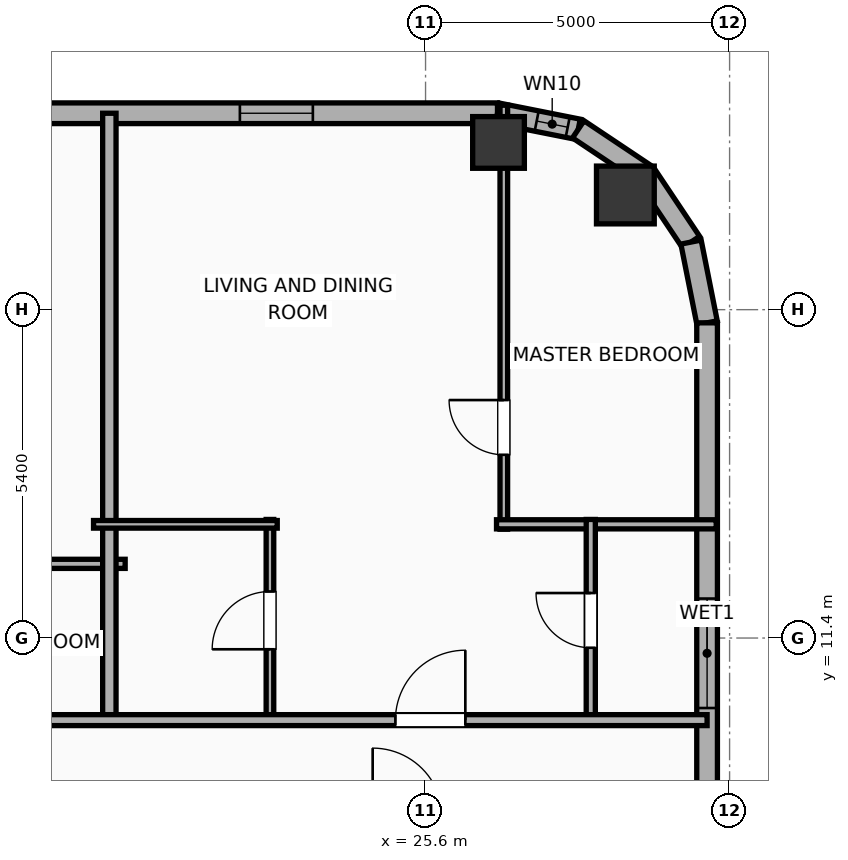
"""IFC4 building model, lengths in metres.
Left out: names, types, materials, properties, quantities, classifications, styles, units other than length and angle.
Written with IfcOpenShell. Run it as: python <this file> out.ifc"""

import sys

from ifc_helpers import new_model, si_unit, direction, frame, frame_2d, origin, origin_2d, place, context, subcontext, project, spatial, rectangle, hollow_rectangle, hollow_circle, extrude, element, fill, save


model = new_model("IFC4")
c1 = context("Model", 3, precision=1e-05, world=origin(), true_north=direction((0.0, 1.0)))
c2 = subcontext(c1, "Body", "Model", "MODEL_VIEW")
j1 = project(units=[si_unit("LENGTHUNIT", "METRE"), si_unit("PLANEANGLEUNIT", "RADIAN")], contexts=[c1])
p1 = place(None, origin())
s1 = spatial("IfcSite", under=j1, at=p1, CompositionType="ELEMENT")
p2 = place(p1, origin())
s2 = spatial("IfcBuilding", under=s1, at=p2, CompositionType="ELEMENT")
p3 = place(p2, frame((0.0, 0.0, 211.9)))
s3 = spatial("IfcBuildingStorey", under=s2, at=p3, CompositionType="ELEMENT", Elevation=211.9)
p4 = place(p3, frame((28.886, 18.686, 0.0), z_axis=(0.0, 0.0, 1.0), x_axis=(1.0, 0.0, 0.0)))
e1 = element("IfcColumn", 1, at=p4, inside=s3, PredefinedType="COLUMN", context=c2, shape_type="SweptSolid", body=[
    extrude(hollow_circle(Radius=0.475, WallThickness=0.032, at=origin_2d()), origin(), (0.0, 0.0, 1.0), 3.9),
])
p5 = place(p3, frame((26.8, 19.55, 0.0), z_axis=(0.0, 0.0, 1.0), x_axis=(1.0, 0.0, 0.0)))
e2 = element("IfcColumn", 2, at=p5, inside=s3, PredefinedType="COLUMN", context=c2, shape_type="SweptSolid", body=[
    extrude(hollow_rectangle(XDim=0.85, YDim=0.85, WallThickness=0.028, at=origin_2d()), origin(), (0.0, 0.0, 1.0), 3.9),
])
p6 = place(p3, frame((9.931, 20.03, 0.0), z_axis=(0.0, 0.0, 1.0), x_axis=(1.0, 0.0, 0.0)))
e3 = element("IfcWall", 3, at=p6, inside=s3, PredefinedType="ELEMENTEDWALL", context=c2, shape_type="SweptSolid", body=[
    extrude(rectangle(XDim=16.853, YDim=0.34, at=frame_2d((8.426, 0.0))), origin(), (0.0, 0.0, 1.0), 3.65),
])
p7 = place(p6, frame((2.402, 0.0, 0.75)))
e4 = element("IfcOpeningElement", 4, at=p7, cuts=e3, PredefinedType="OPENING", context=c2, shape_type="SweptSolid", body=[
    extrude(rectangle(XDim=1.2, YDim=2.05, at=frame_2d((0.6, 1.025))), frame((0.0, 0.18, 0.0), z_axis=(0.0, -1.0, 0.0), x_axis=(1.0, 0.0, 0.0)), (0.0, 0.0, 1.0), 0.36),
])
p8 = place(p6, frame((7.609, 0.0, 0.75)))
e5 = element("IfcOpeningElement", 5, at=p8, cuts=e3, PredefinedType="OPENING", context=c2, shape_type="SweptSolid", body=[
    extrude(rectangle(XDim=1.2, YDim=2.05, at=frame_2d((0.6, 1.025))), frame((0.0, 0.18, 0.0), z_axis=(0.0, -1.0, 0.0), x_axis=(1.0, 0.0, 0.0)), (0.0, 0.0, 1.0), 0.36),
])
p9 = place(p6, frame((12.616, 0.0, 0.75)))
e6 = element("IfcOpeningElement", 6, at=p9, cuts=e3, PredefinedType="OPENING", context=c2, shape_type="SweptSolid", body=[
    extrude(rectangle(XDim=1.2, YDim=2.05, at=frame_2d((0.6, 1.025))), frame((0.0, 0.18, 0.0), z_axis=(0.0, -1.0, 0.0), x_axis=(1.0, 0.0, 0.0)), (0.0, 0.0, 1.0), 0.36),
])
p10 = place(p3, frame((26.783, 20.03, 0.0), z_axis=(0.0, 0.0, 1.0), x_axis=(0.980788153188, -0.195075878998, 0.0)))
e7 = element("IfcWall", 7, at=p10, inside=s3, PredefinedType="ELEMENTEDWALL", context=c2, shape_type="SweptSolid", body=[
    extrude(rectangle(XDim=1.354, YDim=0.34, at=frame_2d((0.677, 0.0))), origin(), (0.0, 0.0, 1.0), 3.65),
])
p11 = place(p10, frame((0.657, 0.0, 0.75)))
e8 = element("IfcOpeningElement", 8, at=p11, cuts=e7, PredefinedType="OPENING", context=c2, shape_type="SweptSolid", body=[
    extrude(rectangle(XDim=0.52, YDim=2.05, at=frame_2d((0.26, 1.025))), frame((0.0, 0.18, 0.0), z_axis=(0.0, -1.0, 0.0), x_axis=(1.0, 0.0, 0.0)), (0.0, 0.0, 1.0), 0.36),
])
for number, where, z_axis, x_axis in (
    (9, (28.111, 19.766, 0.0), (0.0, 0.0, 1.0), (0.831, -0.556, 0.0)),
    (10, (29.223, 19.023, 0.0), (0.0, 0.0, 1.0), (0.556, -0.831, 0.0)),
):
    element("IfcWall", number, at=place(p3, frame(where, z_axis=z_axis, x_axis=x_axis)), inside=s3, PredefinedType="ELEMENTEDWALL", context=c2, shape_type="SweptSolid", body=[
        extrude(rectangle(XDim=1.337, YDim=0.34, at=frame_2d((0.668, 0.0))), origin(), (0.0, 0.0, 1.0), 3.65),
    ])
p12 = place(p3, frame((29.966, 17.911, 0.0), z_axis=(0.0, 0.0, 1.0), x_axis=(0.195075878998, -0.980788153188, 0.0)))
e11 = element("IfcWall", 11, at=p12, inside=s3, PredefinedType="ELEMENTEDWALL", context=c2, shape_type="SweptSolid", body=[
    extrude(rectangle(XDim=1.354, YDim=0.34, at=frame_2d((0.677, 0.0))), origin(), (0.0, 0.0, 1.0), 3.65),
])
p13 = place(p3, frame((30.23, 16.583, 0.0), z_axis=(0.0, 0.0, 1.0), x_axis=(0.0, -1.0, 0.0)))
e12 = element("IfcWall", 12, at=p13, inside=s3, PredefinedType="ELEMENTEDWALL", context=c2, shape_type="SweptSolid", body=[
    extrude(rectangle(XDim=10.869, YDim=0.34, at=frame_2d((5.434, 0.0))), origin(), (0.0, 0.0, 1.0), 3.65),
])
p14 = place(p13, frame((4.534, 0.0, 0.75)))
e13 = element("IfcOpeningElement", 13, at=p14, cuts=e12, PredefinedType="OPENING", context=c2, shape_type="SweptSolid", body=[
    extrude(rectangle(XDim=1.8, YDim=2.1, at=frame_2d((0.9, 1.05))), frame((0.0, 0.18, 0.0), z_axis=(0.0, -1.0, 0.0), x_axis=(1.0, 0.0, 0.0)), (0.0, 0.0, 1.0), 0.36),
])
p15 = place(p3, frame((18.213, 12.62, 0.0), z_axis=(0.0, 0.0, 1.0), x_axis=(1.0, 0.0, 0.0)))
e14 = element("IfcWall", 14, at=p15, inside=s3, PredefinedType="PLUMBINGWALL", context=c2, shape_type="SweptSolid", body=[
    extrude(rectangle(XDim=2.447, YDim=0.15, at=frame_2d((1.224, 0.0))), origin(), (0.0, 0.0, 1.0), 3.65),
])
p16 = place(p3, frame((20.4, 9.97, 0.0), z_axis=(0.0, 0.0, 1.0), x_axis=(0.0, 1.0, 0.0)))
e15 = element("IfcWall", 15, at=p16, inside=s3, PredefinedType="PARTITIONING", context=c2, shape_type="SweptSolid", body=[
    extrude(rectangle(XDim=10.06, YDim=0.22, at=frame_2d((5.03, 0.0))), origin(), (0.0, 0.0, 1.0), 3.65),
])
p17 = place(p3, frame((26.887, 13.19, 0.0), z_axis=(0.0, 0.0, 1.0), x_axis=(0.0, 1.0, 0.0)))
e16 = element("IfcWall", 16, at=p17, inside=s3, PredefinedType="PARTITIONING", context=c2, shape_type="SweptSolid", body=[
    extrude(rectangle(XDim=6.972, YDim=0.125, at=frame_2d((3.486, 0.0))), origin(), (0.0, 0.0, 1.0), 3.65),
])
p18 = place(p17, frame((1.223, 0.0, 0.0)))
e17 = element("IfcOpeningElement", 17, at=p18, cuts=e16, PredefinedType="OPENING", context=c2, shape_type="SweptSolid", body=[
    extrude(rectangle(XDim=0.9, YDim=2.05, at=frame_2d((0.45, 1.025))), frame((0.0, 0.073, 0.0), z_axis=(0.0, -1.0, 0.0), x_axis=(1.0, 0.0, 0.0)), (0.0, 0.0, 1.0), 0.145),
])
p19 = place(p3, frame((26.767, 13.27, 0.0), z_axis=(0.0, 0.0, 1.0), x_axis=(1.0, 0.0, 0.0)))
e18 = element("IfcWall", 18, at=p19, inside=s3, PredefinedType="PLUMBINGWALL", context=c2, shape_type="SweptSolid", body=[
    extrude(rectangle(XDim=3.613, YDim=0.15, at=frame_2d((1.806, 0.0))), origin(), (0.0, 0.0, 1.0), 3.65),
])
p20 = place(p3, frame((23.041, 10.03, 0.0), z_axis=(0.0, 0.0, 1.0), x_axis=(0.0, 1.0, 0.0)))
e19 = element("IfcWall", 19, at=p20, inside=s3, PredefinedType="PARTITIONING", context=c2, shape_type="SweptSolid", body=[
    extrude(rectangle(XDim=3.32, YDim=0.125, at=frame_2d((1.66, 0.0))), origin(), (0.0, 0.0, 1.0), 3.65),
])
p21 = place(p20, frame((1.185, 0.0, 0.0)))
e20 = element("IfcOpeningElement", 20, at=p21, cuts=e19, PredefinedType="OPENING", context=c2, shape_type="SweptSolid", body=[
    extrude(rectangle(XDim=0.95, YDim=2.05, at=frame_2d((0.475, 1.025))), frame((0.0, 0.073, 0.0), z_axis=(0.0, -1.0, 0.0), x_axis=(1.0, 0.0, 0.0)), (0.0, 0.0, 1.0), 0.145),
])
p22 = place(p3, frame((20.14, 13.27, 0.0), z_axis=(0.0, 0.0, 1.0), x_axis=(1.0, 0.0, 0.0)))
e21 = element("IfcWall", 21, at=p22, inside=s3, PredefinedType="PARTITIONING", context=c2, shape_type="SweptSolid", body=[
    extrude(rectangle(XDim=3.021, YDim=0.125, at=frame_2d((1.51, 0.0))), origin(), (0.0, 0.0, 1.0), 3.65),
])
p23 = place(p3, frame((28.317, 10.03, 0.0), z_axis=(0.0, 0.0, 1.0), x_axis=(0.0, 1.0, 0.0)))
e22 = element("IfcWall", 22, at=p23, inside=s3, PredefinedType="PLUMBINGWALL", context=c2, shape_type="SweptSolid", body=[
    extrude(rectangle(XDim=3.32, YDim=0.15, at=frame_2d((1.66, 0.0))), origin(), (0.0, 0.0, 1.0), 3.65),
])
p24 = place(p23, frame((1.21, 0.0, 0.0)))
e23 = element("IfcOpeningElement", 23, at=p24, cuts=e22, PredefinedType="OPENING", context=c2, shape_type="SweptSolid", body=[
    extrude(rectangle(XDim=0.9, YDim=2.05, at=frame_2d((0.45, 1.025))), frame((0.0, 0.085, 0.0), z_axis=(0.0, -1.0, 0.0), x_axis=(1.0, 0.0, 0.0)), (0.0, 0.0, 1.0), 0.17),
])
p25 = place(p3, frame((-26.23, 10.05, 0.0), z_axis=(0.0, 0.0, 1.0), x_axis=(1.0, 0.0, 0.0)))
e24 = element("IfcWall", 24, at=p25, inside=s3, PredefinedType="PARTITIONING", context=c2, shape_type="SweptSolid", body=[
    extrude(rectangle(XDim=56.46, YDim=0.18, at=frame_2d((28.23, 0.0))), origin(), (0.0, 0.0, 1.0), 3.65),
])
p26 = place(p25, frame((4.41, 0.0, 0.0)))
e25 = element("IfcOpeningElement", 25, at=p26, cuts=e24, PredefinedType="OPENING", context=c2, shape_type="SweptSolid", body=[
    extrude(rectangle(XDim=1.15, YDim=2.05, at=frame_2d((0.575, 1.025))), frame((0.0, 0.1, 0.0), z_axis=(0.0, -1.0, 0.0), x_axis=(1.0, 0.0, 0.0)), (0.0, 0.0, 1.0), 0.2),
])
p27 = place(p25, frame((12.203, 0.0, 0.0)))
e26 = element("IfcOpeningElement", 26, at=p27, cuts=e24, PredefinedType="OPENING", context=c2, shape_type="SweptSolid", body=[
    extrude(rectangle(XDim=0.9, YDim=2.05, at=frame_2d((0.45, 1.025))), frame((0.0, 0.1, 0.0), z_axis=(0.0, -1.0, 0.0), x_axis=(1.0, 0.0, 0.0)), (0.0, 0.0, 1.0), 0.2),
])
p28 = place(p25, frame((19.429, 0.0, 0.0)))
e27 = element("IfcOpeningElement", 27, at=p28, cuts=e24, PredefinedType="OPENING", context=c2, shape_type="SweptSolid", body=[
    extrude(rectangle(XDim=1.15, YDim=2.05, at=frame_2d((0.575, 1.025))), frame((0.0, 0.1, 0.0), z_axis=(0.0, -1.0, 0.0), x_axis=(1.0, 0.0, 0.0)), (0.0, 0.0, 1.0), 0.2),
])
p29 = place(p25, frame((24.601, 0.0, 0.0)))
e28 = element("IfcOpeningElement", 28, at=p29, cuts=e24, PredefinedType="OPENING", context=c2, shape_type="SweptSolid", body=[
    extrude(rectangle(XDim=0.9, YDim=2.05, at=frame_2d((0.45, 1.025))), frame((0.0, 0.1, 0.0), z_axis=(0.0, -1.0, 0.0), x_axis=(1.0, 0.0, 0.0)), (0.0, 0.0, 1.0), 0.2),
])
p30 = place(p25, frame((30.801, 0.0, 0.0)))
e29 = element("IfcOpeningElement", 29, at=p30, cuts=e24, PredefinedType="OPENING", context=c2, shape_type="SweptSolid", body=[
    extrude(rectangle(XDim=0.9, YDim=2.05, at=frame_2d((0.45, 1.025))), frame((0.0, 0.1, 0.0), z_axis=(0.0, -1.0, 0.0), x_axis=(1.0, 0.0, 0.0)), (0.0, 0.0, 1.0), 0.2),
])
p31 = place(p25, frame((35.52, 0.0, 0.0)))
e30 = element("IfcOpeningElement", 30, at=p31, cuts=e24, PredefinedType="OPENING", context=c2, shape_type="SweptSolid", body=[
    extrude(rectangle(XDim=1.15, YDim=2.05, at=frame_2d((0.575, 1.025))), frame((0.0, 0.1, 0.0), z_axis=(0.0, -1.0, 0.0), x_axis=(1.0, 0.0, 0.0)), (0.0, 0.0, 1.0), 0.2),
])
p32 = place(p25, frame((43.199, 0.0, 0.0)))
e31 = element("IfcOpeningElement", 31, at=p32, cuts=e24, PredefinedType="OPENING", context=c2, shape_type="SweptSolid", body=[
    extrude(rectangle(XDim=0.9, YDim=2.05, at=frame_2d((0.45, 1.025))), frame((0.0, 0.1, 0.0), z_axis=(0.0, -1.0, 0.0), x_axis=(1.0, 0.0, 0.0)), (0.0, 0.0, 1.0), 0.2),
])
p33 = place(p25, frame((51.334, 0.0, 0.0)))
e32 = element("IfcOpeningElement", 32, at=p33, cuts=e24, PredefinedType="OPENING", context=c2, shape_type="SweptSolid", body=[
    extrude(rectangle(XDim=1.15, YDim=2.05, at=frame_2d((0.575, 1.025))), frame((0.0, 0.1, 0.0), z_axis=(0.0, -1.0, 0.0), x_axis=(1.0, 0.0, 0.0)), (0.0, 0.0, 1.0), 0.2),
])
p34 = place(p14, origin())
e33 = element("IfcWindow", 33, at=p34, inside=s3, PartitioningType="SINGLE_PANEL", PredefinedType="WINDOW", context=c2, shape_type="SweptSolid", body=[
    extrude(rectangle(XDim=1.8, YDim=2.1, at=frame_2d((0.9, 1.05))), frame((0.0, 0.03, 0.0), z_axis=(0.0, -1.0, 0.0), x_axis=(1.0, 0.0, 0.0)), (0.0, 0.0, 1.0), 0.06),
])
fill(e13, e33)
p35 = place(p9, origin())
e34 = element("IfcWindow", 34, at=p35, inside=s3, PartitioningType="SINGLE_PANEL", PredefinedType="WINDOW", context=c2, shape_type="SweptSolid", body=[
    extrude(rectangle(XDim=1.2, YDim=2.05, at=frame_2d((0.6, 1.025))), frame((0.0, 0.03, 0.0), z_axis=(0.0, -1.0, 0.0), x_axis=(1.0, 0.0, 0.0)), (0.0, 0.0, 1.0), 0.06),
])
fill(e6, e34)
p36 = place(p11, origin())
e35 = element("IfcWindow", 35, at=p36, inside=s3, PartitioningType="SINGLE_PANEL", PredefinedType="WINDOW", context=c2, shape_type="SweptSolid", body=[
    extrude(rectangle(XDim=0.52, YDim=2.05, at=frame_2d((0.26, 1.025))), frame((0.0, 0.03, 0.0), z_axis=(0.0, -1.0, 0.0), x_axis=(1.0, 0.0, 0.0)), (0.0, 0.0, 1.0), 0.06),
])
fill(e8, e35)
p37 = place(p18, origin())
e36 = element("IfcDoor", 36, at=p37, inside=s3, OperationType="SINGLE_SWING_RIGHT", PredefinedType="DOOR", context=c2, shape_type="SweptSolid", body=[
    extrude(rectangle(XDim=0.9, YDim=2.05, at=frame_2d((0.45, 1.025))), frame((0.0, 0.025, 0.0), z_axis=(0.0, -1.0, 0.0), x_axis=(1.0, 0.0, 0.0)), (0.0, 0.0, 1.0), 0.05),
])
fill(e17, e36)
p38 = place(p21, origin())
e37 = element("IfcDoor", 37, at=p38, inside=s3, OperationType="SINGLE_SWING_LEFT", PredefinedType="DOOR", context=c2, shape_type="SweptSolid", body=[
    extrude(rectangle(XDim=0.95, YDim=2.05, at=frame_2d((0.475, 1.025))), frame((0.0, 0.025, 0.0), z_axis=(0.0, -1.0, 0.0), x_axis=(1.0, 0.0, 0.0)), (0.0, 0.0, 1.0), 0.05),
])
fill(e20, e37)
p39 = place(p24, origin())
e38 = element("IfcDoor", 38, at=p39, inside=s3, OperationType="SINGLE_SWING_RIGHT", PredefinedType="DOOR", context=c2, shape_type="SweptSolid", body=[
    extrude(rectangle(XDim=0.9, YDim=2.05, at=frame_2d((0.45, 1.025))), frame((0.0, 0.025, 0.0), z_axis=(0.0, -1.0, 0.0), x_axis=(1.0, 0.0, 0.0)), (0.0, 0.0, 1.0), 0.05),
])
fill(e23, e38)
p40 = place(p33, origin())
e39 = element("IfcDoor", 39, at=p40, inside=s3, OperationType="SINGLE_SWING_RIGHT", PredefinedType="DOOR", context=c2, shape_type="SweptSolid", body=[
    extrude(rectangle(XDim=1.15, YDim=2.05, at=frame_2d((0.575, 1.025))), frame((0.0, 0.025, 0.0), z_axis=(0.0, -1.0, 0.0), x_axis=(1.0, 0.0, 0.0)), (0.0, 0.0, 1.0), 0.05),
])
fill(e32, e39)
save(model, sys.argv[1])
